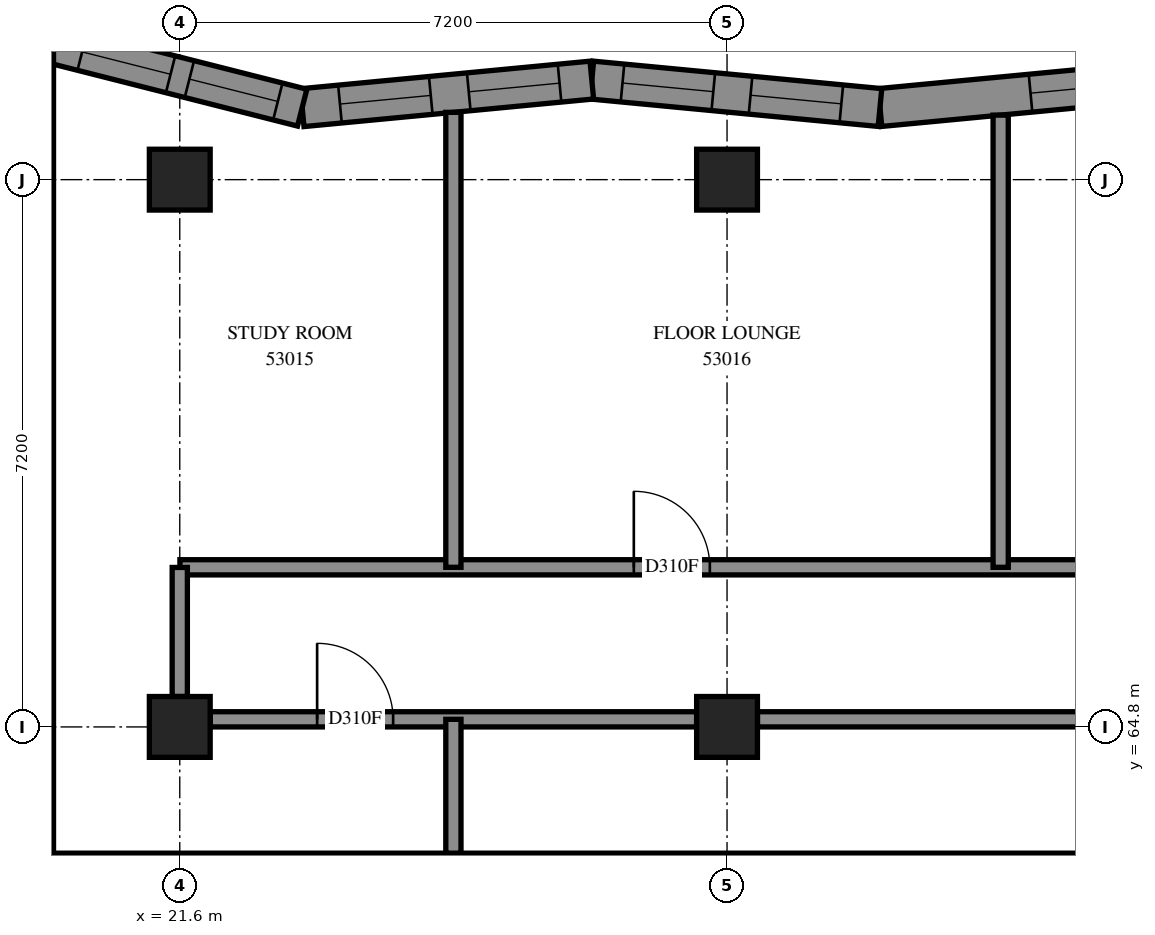
"""IFC4 building model, lengths in metres.
Left out: names, types, materials, properties, quantities, classifications, styles, units other than length and angle.
Written with IfcOpenShell. Run it as: python <this file> out.ifc"""

import sys

from ifc_helpers import new_model, si_unit, direction, frame, frame_2d, origin, origin_2d, place, context, subcontext, project, spatial, polyline, rectangle, outline, extrude, element, fill, save


model = new_model("IFC4")
c1 = context("Model", 3, precision=1e-05, world=origin(), true_north=direction((0.0, 1.0)))
c2 = subcontext(c1, "Body", "Model", "MODEL_VIEW")
j1 = project(units=[si_unit("LENGTHUNIT", "METRE"), si_unit("PLANEANGLEUNIT", "RADIAN")], contexts=[c1])
p1 = place(None, origin())
s1 = spatial("IfcSite", under=j1, at=p1, CompositionType="ELEMENT")
p2 = place(p1, origin())
s2 = spatial("IfcBuilding", under=s1, at=p2, CompositionType="ELEMENT")
p3 = place(p2, frame((0.0, 0.0, 196.4)))
s3 = spatial("IfcBuildingStorey", under=s2, at=p3, CompositionType="ELEMENT", Elevation=196.4)
for number, where, z_axis, x_axis in (
    (1, (21.6, 64.8, 0.0), (0.0, 0.0, 1.0), (1.0, 0.0, 0.0)),
    (2, (21.6, 72.0, 0.0), (0.0, 0.0, 1.0), (1.0, 0.0, 0.0)),
    (3, (28.8, 64.8, 0.0), (0.0, 0.0, 1.0), (1.0, 0.0, 0.0)),
    (4, (28.8, 72.0, 0.0), (0.0, 0.0, 1.0), (1.0, 0.0, 0.0)),
):
    element("IfcColumn", number, at=place(p3, frame(where, z_axis=z_axis, x_axis=x_axis)), inside=s3, PredefinedType="COLUMN", context=c2, shape_type="SweptSolid", body=[
        extrude(rectangle(XDim=0.8, YDim=0.8, at=origin_2d()), origin(), (0.0, 0.0, 1.0), 3.1),
    ])
p4 = place(p3, frame((34.603, 73.31, 0.0), z_axis=(0.0, 0.0, 1.0), x_axis=(-0.9954966527, -0.0947967005, 0.0)))
e5 = element("IfcWall", 5, at=p4, inside=s3, PredefinedType="SOLIDWALL", context=c2, shape_type="SweptSolid", body=[
    extrude(outline(polyline([(-0.024, -0.25), (3.784, -0.25), (3.832, 0.25), (0.024, 0.25), (-0.024, -0.25)])), origin(), (0.0, 0.0, 1.0), 3.1),
])
p5 = place(p4, frame((0.618, 0.0, 0.45)))
e6 = element("IfcOpeningElement", 6, at=p5, cuts=e5, PredefinedType="OPENING", context=c2, shape_type="SweptSolid", body=[
    extrude(rectangle(XDim=1.2, YDim=2.5, at=frame_2d((0.6, 1.25))), frame((0.0, 0.26, 0.0), z_axis=(0.0, -1.0, 0.0), x_axis=(1.0, 0.0, 0.0)), (0.0, 0.0, 1.0), 0.52),
])
p6 = place(p3, frame((30.812, 72.949, 0.0), z_axis=(0.0, 0.0, 1.0), x_axis=(-0.9954966527, 0.0947967005, 0.0)))
e7 = element("IfcWall", 7, at=p6, inside=s3, PredefinedType="SOLIDWALL", context=c2, shape_type="SweptSolid", body=[
    extrude(outline(polyline([(0.024, -0.25), (3.832, -0.25), (3.784, 0.25), (-0.024, 0.25), (0.024, -0.25)])), origin(), (0.0, 0.0, 1.0), 3.1),
])
p7 = place(p6, frame((0.511, 0.0, 0.45)))
e8 = element("IfcOpeningElement", 8, at=p7, cuts=e7, PredefinedType="OPENING", context=c2, shape_type="SweptSolid", body=[
    extrude(rectangle(XDim=1.2, YDim=2.5, at=frame_2d((0.6, 1.25))), frame((0.0, 0.26, 0.0), z_axis=(0.0, -1.0, 0.0), x_axis=(1.0, 0.0, 0.0)), (0.0, 0.0, 1.0), 0.52),
])
p8 = place(p6, frame((2.203, 0.0, 0.45)))
e9 = element("IfcOpeningElement", 9, at=p8, cuts=e7, PredefinedType="OPENING", context=c2, shape_type="SweptSolid", body=[
    extrude(rectangle(XDim=1.2, YDim=2.5, at=frame_2d((0.6, 1.25))), frame((0.0, 0.26, 0.0), z_axis=(0.0, -1.0, 0.0), x_axis=(1.0, 0.0, 0.0)), (0.0, 0.0, 1.0), 0.52),
])
p9 = place(p3, frame((27.021, 73.31, 0.0), z_axis=(0.0, 0.0, 1.0), x_axis=(-0.9954953552, -0.0948103255, 0.0)))
e10 = element("IfcWall", 10, at=p9, inside=s3, PredefinedType="SOLIDWALL", context=c2, shape_type="SweptSolid", body=[
    extrude(outline(polyline([(-0.024, -0.25), (3.784, -0.25), (3.871, 0.25), (0.024, 0.25), (-0.024, -0.25)])), origin(), (0.0, 0.0, 1.0), 3.1),
])
p10 = place(p9, frame((0.426, 0.0, 0.45)))
e11 = element("IfcOpeningElement", 11, at=p10, cuts=e10, PredefinedType="OPENING", context=c2, shape_type="SweptSolid", body=[
    extrude(rectangle(XDim=1.2, YDim=2.5, at=frame_2d((0.6, 1.25))), frame((0.0, 0.26, 0.0), z_axis=(0.0, -1.0, 0.0), x_axis=(1.0, 0.0, 0.0)), (0.0, 0.0, 1.0), 0.52),
])
p11 = place(p9, frame((2.128, 0.0, 0.45)))
e12 = element("IfcOpeningElement", 12, at=p11, cuts=e10, PredefinedType="OPENING", context=c2, shape_type="SweptSolid", body=[
    extrude(rectangle(XDim=1.2, YDim=2.5, at=frame_2d((0.6, 1.25))), frame((0.0, 0.26, 0.0), z_axis=(0.0, -1.0, 0.0), x_axis=(1.0, 0.0, 0.0)), (0.0, 0.0, 1.0), 0.52),
])
p12 = place(p3, frame((23.211, 72.947, 0.0), z_axis=(0.0, 0.0, 1.0), x_axis=(-0.9693406445, 0.2457208068, 0.0)))
e13 = element("IfcWall", 13, at=p12, inside=s3, PredefinedType="SOLIDWALL", context=c2, shape_type="SweptSolid", body=[
    extrude(outline(polyline([(0.043, -0.25), (3.954, -0.25), (3.312, 0.25), (-0.043, 0.25), (0.043, -0.25)])), origin(), (0.0, 0.0, 1.0), 3.1),
])
p13 = place(p12, frame((0.331, 0.0, 0.45)))
e14 = element("IfcOpeningElement", 14, at=p13, cuts=e13, PredefinedType="OPENING", context=c2, shape_type="SweptSolid", body=[
    extrude(rectangle(XDim=1.2, YDim=2.5, at=frame_2d((0.6, 1.25))), frame((0.0, 0.26, 0.0), z_axis=(0.0, -1.0, 0.0), x_axis=(1.0, 0.0, 0.0)), (0.0, 0.0, 1.0), 0.52),
])
p14 = place(p12, frame((1.787, 0.0, 0.45)))
e15 = element("IfcOpeningElement", 15, at=p14, cuts=e13, PredefinedType="OPENING", context=c2, shape_type="SweptSolid", body=[
    extrude(rectangle(XDim=1.2, YDim=2.5, at=frame_2d((0.6, 1.25))), frame((0.0, 0.26, 0.0), z_axis=(0.0, -1.0, 0.0), x_axis=(1.0, 0.0, 0.0)), (0.0, 0.0, 1.0), 0.52),
])
p15 = place(p3, frame((19.689, 73.84, 0.0), z_axis=(0.0, 0.0, 1.0), x_axis=(0.0, -1.0, 0.0)))
e16 = element("IfcWall", 16, at=p15, inside=s3, PredefinedType="SOLIDWALL", context=c2, shape_type="SweptSolid", body=[
    extrude(outline(polyline([(-0.321, -0.25), (11.201, -0.25), (10.701, 0.25), (0.321, 0.25), (-0.321, -0.25)])), origin(), (0.0, 0.0, 1.0), 3.1),
])
p16 = place(p15, frame((2.24, 0.0, 0.45)))
e17 = element("IfcOpeningElement", 17, at=p16, cuts=e16, PredefinedType="OPENING", context=c2, shape_type="SweptSolid", body=[
    extrude(rectangle(XDim=1.3, YDim=2.5, at=frame_2d((0.65, 1.25))), frame((0.0, 0.26, 0.0), z_axis=(0.0, -1.0, 0.0), x_axis=(1.0, 0.0, 0.0)), (0.0, 0.0, 1.0), 0.52),
])
p17 = place(p15, frame((3.74, 0.0, 0.45)))
e18 = element("IfcOpeningElement", 18, at=p17, cuts=e16, PredefinedType="OPENING", context=c2, shape_type="SweptSolid", body=[
    extrude(rectangle(XDim=1.3, YDim=2.5, at=frame_2d((0.65, 1.25))), frame((0.0, 0.26, 0.0), z_axis=(0.0, -1.0, 0.0), x_axis=(1.0, 0.0, 0.0)), (0.0, 0.0, 1.0), 0.52),
])
p18 = place(p15, frame((5.84, 0.0, 0.45)))
e19 = element("IfcOpeningElement", 19, at=p18, cuts=e16, PredefinedType="OPENING", context=c2, shape_type="SweptSolid", body=[
    extrude(rectangle(XDim=1.3, YDim=2.5, at=frame_2d((0.65, 1.25))), frame((0.0, 0.26, 0.0), z_axis=(0.0, -1.0, 0.0), x_axis=(1.0, 0.0, 0.0)), (0.0, 0.0, 1.0), 0.52),
])
p19 = place(p15, frame((7.34, 0.0, 0.45)))
e20 = element("IfcOpeningElement", 20, at=p19, cuts=e16, PredefinedType="OPENING", context=c2, shape_type="SweptSolid", body=[
    extrude(rectangle(XDim=1.3, YDim=2.5, at=frame_2d((0.65, 1.25))), frame((0.0, 0.26, 0.0), z_axis=(0.0, -1.0, 0.0), x_axis=(1.0, 0.0, 0.0)), (0.0, 0.0, 1.0), 0.52),
])
p20 = place(p15, frame((9.17, 0.0, 0.45)))
e21 = element("IfcOpeningElement", 21, at=p20, cuts=e16, PredefinedType="OPENING", context=c2, shape_type="SweptSolid", body=[
    extrude(rectangle(XDim=1.2, YDim=2.5, at=frame_2d((0.6, 1.25))), frame((0.0, 0.26, 0.0), z_axis=(0.0, -1.0, 0.0), x_axis=(1.0, 0.0, 0.0)), (0.0, 0.0, 1.0), 0.52),
])
p21 = place(p3, frame((19.689, 62.889, 0.0), z_axis=(0.0, 0.0, 1.0), x_axis=(1.0, 0.0, 0.0)))
e22 = element("IfcWall", 22, at=p21, inside=s3, PredefinedType="SOLIDWALL", context=c2, shape_type="SweptSolid", body=[
    extrude(outline(polyline([(-0.25, -0.25), (15.111, -0.25), (15.611, 0.25), (0.25, 0.25), (-0.25, -0.25)])), origin(), (0.0, 0.0, 1.0), 3.1),
])
p22 = place(p21, frame((2.311, 0.0, 0.45)))
e23 = element("IfcOpeningElement", 23, at=p22, cuts=e22, PredefinedType="OPENING", context=c2, shape_type="SweptSolid", body=[
    extrude(rectangle(XDim=1.3, YDim=2.5, at=frame_2d((0.65, 1.25))), frame((0.0, 0.26, 0.0), z_axis=(0.0, -1.0, 0.0), x_axis=(1.0, 0.0, 0.0)), (0.0, 0.0, 1.0), 0.52),
])
p23 = place(p21, frame((3.811, 0.0, 0.45)))
e24 = element("IfcOpeningElement", 24, at=p23, cuts=e22, PredefinedType="OPENING", context=c2, shape_type="SweptSolid", body=[
    extrude(rectangle(XDim=1.3, YDim=2.5, at=frame_2d((0.65, 1.25))), frame((0.0, 0.26, 0.0), z_axis=(0.0, -1.0, 0.0), x_axis=(1.0, 0.0, 0.0)), (0.0, 0.0, 1.0), 0.52),
])
p24 = place(p21, frame((5.911, 0.0, 0.45)))
e25 = element("IfcOpeningElement", 25, at=p24, cuts=e22, PredefinedType="OPENING", context=c2, shape_type="SweptSolid", body=[
    extrude(rectangle(XDim=1.3, YDim=2.5, at=frame_2d((0.65, 1.25))), frame((0.0, 0.26, 0.0), z_axis=(0.0, -1.0, 0.0), x_axis=(1.0, 0.0, 0.0)), (0.0, 0.0, 1.0), 0.52),
])
p25 = place(p21, frame((7.411, 0.0, 0.45)))
e26 = element("IfcOpeningElement", 26, at=p25, cuts=e22, PredefinedType="OPENING", context=c2, shape_type="SweptSolid", body=[
    extrude(rectangle(XDim=1.3, YDim=2.5, at=frame_2d((0.65, 1.25))), frame((0.0, 0.26, 0.0), z_axis=(0.0, -1.0, 0.0), x_axis=(1.0, 0.0, 0.0)), (0.0, 0.0, 1.0), 0.52),
])
p26 = place(p21, frame((9.261, 0.0, 0.45)))
e27 = element("IfcOpeningElement", 27, at=p26, cuts=e22, PredefinedType="OPENING", context=c2, shape_type="SweptSolid", body=[
    extrude(rectangle(XDim=1.3, YDim=2.5, at=frame_2d((0.65, 1.25))), frame((0.0, 0.26, 0.0), z_axis=(0.0, -1.0, 0.0), x_axis=(1.0, 0.0, 0.0)), (0.0, 0.0, 1.0), 0.52),
])
p27 = place(p21, frame((10.761, 0.0, 0.45)))
e28 = element("IfcOpeningElement", 28, at=p27, cuts=e22, PredefinedType="OPENING", context=c2, shape_type="SweptSolid", body=[
    extrude(rectangle(XDim=1.3, YDim=2.5, at=frame_2d((0.65, 1.25))), frame((0.0, 0.26, 0.0), z_axis=(0.0, -1.0, 0.0), x_axis=(1.0, 0.0, 0.0)), (0.0, 0.0, 1.0), 0.52),
])
p28 = place(p21, frame((0.581, 0.0, 0.45)))
e29 = element("IfcOpeningElement", 29, at=p28, cuts=e22, PredefinedType="OPENING", context=c2, shape_type="SweptSolid", body=[
    extrude(rectangle(XDim=1.2, YDim=2.5, at=frame_2d((0.6, 1.25))), frame((0.0, 0.26, 0.0), z_axis=(0.0, -1.0, 0.0), x_axis=(1.0, 0.0, 0.0)), (0.0, 0.0, 1.0), 0.52),
])
p29 = place(p21, frame((13.336, 0.0, 0.45)))
e30 = element("IfcOpeningElement", 30, at=p29, cuts=e22, PredefinedType="OPENING", context=c2, shape_type="SweptSolid", body=[
    extrude(rectangle(XDim=1.2, YDim=2.5, at=frame_2d((0.6, 1.25))), frame((0.0, 0.26, 0.0), z_axis=(0.0, -1.0, 0.0), x_axis=(1.0, 0.0, 0.0)), (0.0, 0.0, 1.0), 0.52),
])
p30 = place(p3, frame((21.602, 66.9, 0.0), z_axis=(0.0, 0.0, 1.0), x_axis=(1.0, 0.0, 0.0)))
e31 = element("IfcWall", 31, at=p30, inside=s3, PredefinedType="PARTITIONING", context=c2, shape_type="SweptSolid", body=[
    extrude(rectangle(XDim=18.998, YDim=0.2, at=frame_2d((9.499, 0.0))), origin(), (0.0, 0.0, 1.0), 3.1),
])
p31 = place(p30, frame((5.972, 0.0, 0.0)))
e32 = element("IfcOpeningElement", 32, at=p31, cuts=e31, PredefinedType="OPENING", context=c2, shape_type="SweptSolid", body=[
    extrude(rectangle(XDim=1.0, YDim=2.1, at=frame_2d((0.5, 1.05))), frame((0.0, 0.11, 0.0), z_axis=(0.0, -1.0, 0.0), x_axis=(1.0, 0.0, 0.0)), (0.0, 0.0, 1.0), 0.22),
])
p32 = place(p30, frame((13.172, 0.0, 0.0)))
e33 = element("IfcOpeningElement", 33, at=p32, cuts=e31, PredefinedType="OPENING", context=c2, shape_type="SweptSolid", body=[
    extrude(rectangle(XDim=1.0, YDim=2.1, at=frame_2d((0.5, 1.05))), frame((0.0, 0.11, 0.0), z_axis=(0.0, -1.0, 0.0), x_axis=(1.0, 0.0, 0.0)), (0.0, 0.0, 1.0), 0.22),
])
p33 = place(p3, frame((29.2, 64.9, 0.0), z_axis=(0.0, 0.0, 1.0), x_axis=(1.0, 0.0, 0.0)))
e34 = element("IfcWall", 34, at=p33, inside=s3, PredefinedType="PARTITIONING", context=c2, shape_type="SweptSolid", body=[
    extrude(rectangle(XDim=6.4, YDim=0.2, at=frame_2d((3.2, 0.0))), origin(), (0.0, 0.0, 1.0), 2.6),
])
p34 = place(p3, frame((22.0, 64.9, 0.0), z_axis=(0.0, 0.0, 1.0), x_axis=(1.0, 0.0, 0.0)))
e35 = element("IfcWall", 35, at=p34, inside=s3, PredefinedType="PARTITIONING", context=c2, shape_type="SweptSolid", body=[
    extrude(rectangle(XDim=6.4, YDim=0.2, at=frame_2d((3.2, 0.0))), origin(), (0.0, 0.0, 1.0), 2.6),
])
p35 = place(p34, frame((1.407, 0.0, 0.0)))
e36 = element("IfcOpeningElement", 36, at=p35, cuts=e35, PredefinedType="OPENING", context=c2, shape_type="SweptSolid", body=[
    extrude(rectangle(XDim=1.0, YDim=2.1, at=frame_2d((0.5, 1.05))), frame((0.0, 0.11, 0.0), z_axis=(0.0, -1.0, 0.0), x_axis=(1.0, 0.0, 0.0)), (0.0, 0.0, 1.0), 0.22),
])
p36 = place(p3, frame((25.2, 66.9, 0.0), z_axis=(0.0, 0.0, 1.0), x_axis=(0.0, 1.0, 0.0)))
e37 = element("IfcWall", 37, at=p36, inside=s3, PredefinedType="PARTITIONING", context=c2, shape_type="SweptSolid", body=[
    extrude(rectangle(XDim=5.985, YDim=0.2, at=frame_2d((2.993, 0.0))), origin(), (0.0, 0.0, 1.0), 3.1),
])
p37 = place(p3, frame((32.4, 66.9, 0.0), z_axis=(0.0, 0.0, 1.0), x_axis=(0.0, 1.0, 0.0)))
e38 = element("IfcWall", 38, at=p37, inside=s3, PredefinedType="PARTITIONING", context=c2, shape_type="SweptSolid", body=[
    extrude(rectangle(XDim=5.949, YDim=0.2, at=frame_2d((2.974, 0.0))), origin(), (0.0, 0.0, 1.0), 3.1),
])
p38 = place(p3, frame((25.2, 63.139, 0.0), z_axis=(0.0, 0.0, 1.0), x_axis=(0.0, 1.0, 0.0)))
e39 = element("IfcWall", 39, at=p38, inside=s3, PredefinedType="PARTITIONING", context=c2, shape_type="SweptSolid", body=[
    extrude(rectangle(XDim=1.761, YDim=0.2, at=frame_2d((0.88, 0.0))), origin(), (0.0, 0.0, 1.0), 3.1),
])
p39 = place(p3, frame((21.6, 65.2, 0.0), z_axis=(0.0, 0.0, 1.0), x_axis=(0.0, 1.0, 0.0)))
e40 = element("IfcWall", 40, at=p39, inside=s3, PredefinedType="PARTITIONING", context=c2, shape_type="SweptSolid", body=[
    extrude(rectangle(XDim=1.698, YDim=0.2, at=frame_2d((0.849, 0.0))), origin(), (0.0, 0.0, 1.0), 2.6),
])
p40 = place(p5, origin())
e41 = element("IfcWindow", 41, at=p40, inside=s3, PartitioningType="SINGLE_PANEL", PredefinedType="WINDOW", context=c2, shape_type="SweptSolid", body=[
    extrude(rectangle(XDim=1.2, YDim=2.5, at=frame_2d((0.6, 1.25))), frame((0.0, 0.18, 0.0), z_axis=(0.0, -1.0, 0.0), x_axis=(1.0, 0.0, 0.0)), (0.0, 0.0, 1.0), 0.06),
])
fill(e6, e41)
p41 = place(p7, origin())
e42 = element("IfcWindow", 42, at=p41, inside=s3, PartitioningType="SINGLE_PANEL", PredefinedType="WINDOW", context=c2, shape_type="SweptSolid", body=[
    extrude(rectangle(XDim=1.2, YDim=2.5, at=frame_2d((0.6, 1.25))), frame((0.0, 0.18, 0.0), z_axis=(0.0, -1.0, 0.0), x_axis=(1.0, 0.0, 0.0)), (0.0, 0.0, 1.0), 0.06),
])
fill(e8, e42)
p42 = place(p8, origin())
e43 = element("IfcWindow", 43, at=p42, inside=s3, PartitioningType="SINGLE_PANEL", PredefinedType="WINDOW", context=c2, shape_type="SweptSolid", body=[
    extrude(rectangle(XDim=1.2, YDim=2.5, at=frame_2d((0.6, 1.25))), frame((0.0, 0.18, 0.0), z_axis=(0.0, -1.0, 0.0), x_axis=(1.0, 0.0, 0.0)), (0.0, 0.0, 1.0), 0.06),
])
fill(e9, e43)
p43 = place(p10, origin())
e44 = element("IfcWindow", 44, at=p43, inside=s3, PartitioningType="SINGLE_PANEL", PredefinedType="WINDOW", context=c2, shape_type="SweptSolid", body=[
    extrude(rectangle(XDim=1.2, YDim=2.5, at=frame_2d((0.6, 1.25))), frame((0.0, 0.18, 0.0), z_axis=(0.0, -1.0, 0.0), x_axis=(1.0, 0.0, 0.0)), (0.0, 0.0, 1.0), 0.06),
])
fill(e11, e44)
p44 = place(p11, origin())
e45 = element("IfcWindow", 45, at=p44, inside=s3, PartitioningType="SINGLE_PANEL", PredefinedType="WINDOW", context=c2, shape_type="SweptSolid", body=[
    extrude(rectangle(XDim=1.2, YDim=2.5, at=frame_2d((0.6, 1.25))), frame((0.0, 0.18, 0.0), z_axis=(0.0, -1.0, 0.0), x_axis=(1.0, 0.0, 0.0)), (0.0, 0.0, 1.0), 0.06),
])
fill(e12, e45)
p45 = place(p13, origin())
e46 = element("IfcWindow", 46, at=p45, inside=s3, PartitioningType="SINGLE_PANEL", PredefinedType="WINDOW", context=c2, shape_type="SweptSolid", body=[
    extrude(rectangle(XDim=1.2, YDim=2.5, at=frame_2d((0.6, 1.25))), frame((0.0, 0.18, 0.0), z_axis=(0.0, -1.0, 0.0), x_axis=(1.0, 0.0, 0.0)), (0.0, 0.0, 1.0), 0.06),
])
fill(e14, e46)
p46 = place(p14, origin())
e47 = element("IfcWindow", 47, at=p46, inside=s3, PartitioningType="SINGLE_PANEL", PredefinedType="WINDOW", context=c2, shape_type="SweptSolid", body=[
    extrude(rectangle(XDim=1.2, YDim=2.5, at=frame_2d((0.6, 1.25))), frame((0.0, 0.18, 0.0), z_axis=(0.0, -1.0, 0.0), x_axis=(1.0, 0.0, 0.0)), (0.0, 0.0, 1.0), 0.06),
])
fill(e15, e47)
p47 = place(p35, origin())
e48 = element("IfcDoor", 48, at=p47, inside=s3, OperationType="SINGLE_SWING_RIGHT", PredefinedType="DOOR", context=c2, shape_type="SweptSolid", body=[
    extrude(rectangle(XDim=1.0, YDim=2.1, at=frame_2d((0.5, 1.05))), frame((0.0, 0.025, 0.0), z_axis=(0.0, -1.0, 0.0), x_axis=(1.0, 0.0, 0.0)), (0.0, 0.0, 1.0), 0.05),
])
fill(e36, e48)
p48 = place(p31, origin())
e49 = element("IfcDoor", 49, at=p48, inside=s3, OperationType="SINGLE_SWING_LEFT", PredefinedType="DOOR", context=c2, shape_type="SweptSolid", body=[
    extrude(rectangle(XDim=1.0, YDim=2.1, at=frame_2d((0.5, 1.05))), frame((0.0, 0.025, 0.0), z_axis=(0.0, -1.0, 0.0), x_axis=(1.0, 0.0, 0.0)), (0.0, 0.0, 1.0), 0.05),
])
fill(e32, e49)
save(model, sys.argv[1])
